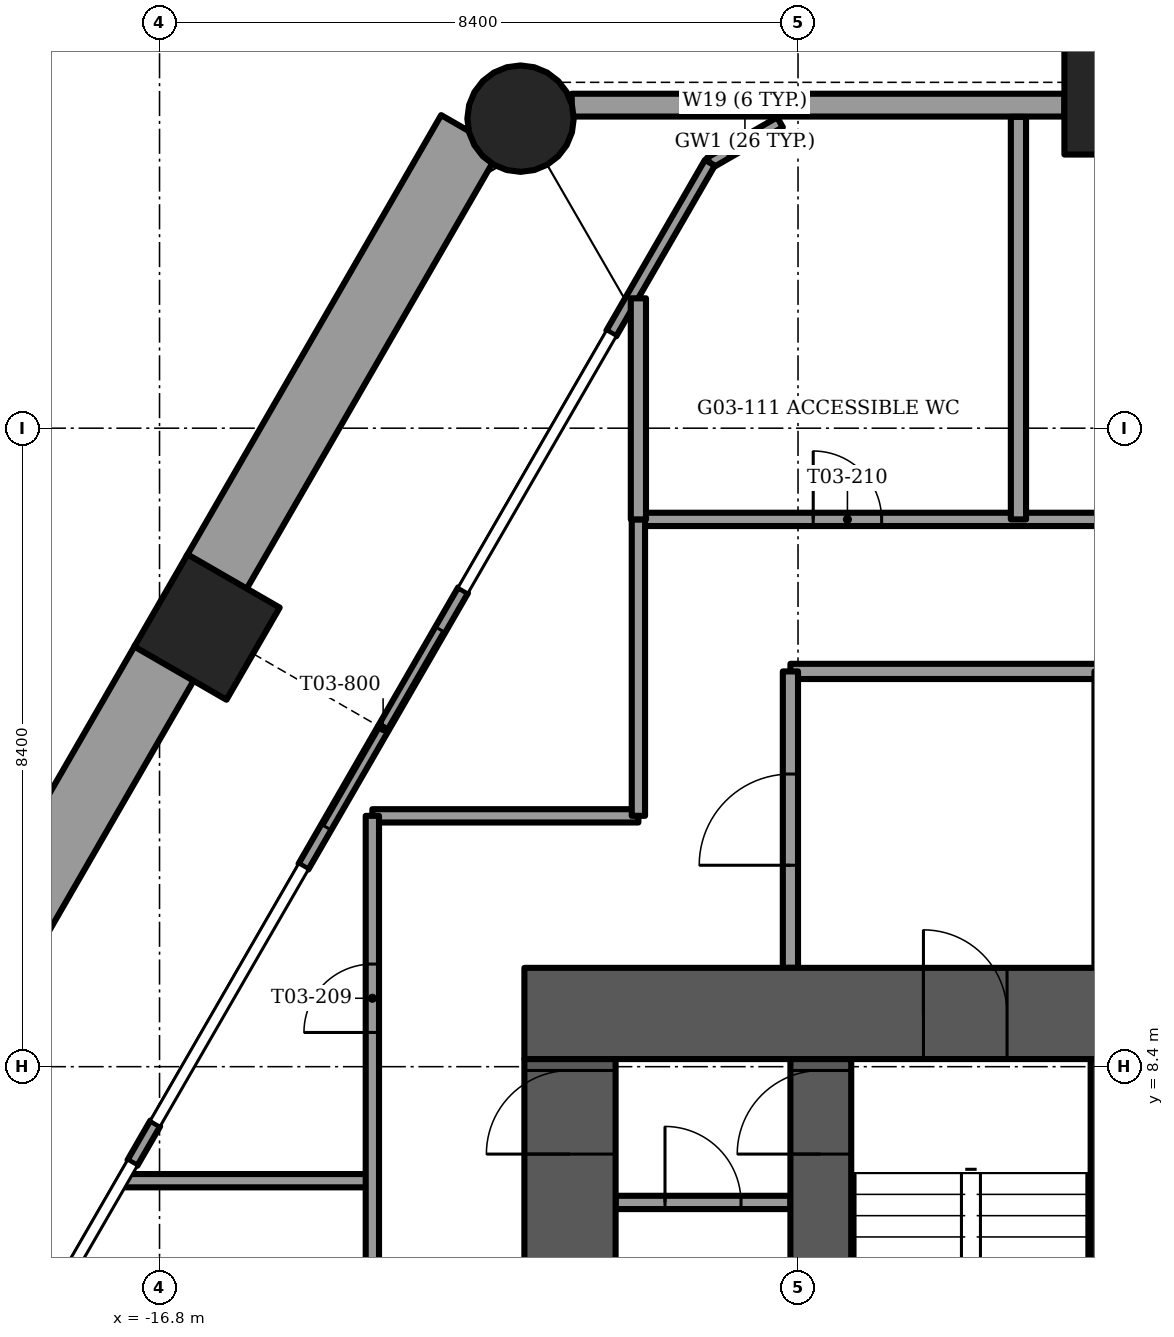
"""IFC4 building model, lengths in metres.
Left out: names, types, materials, properties, quantities, classifications, styles, units other than length and angle.
Written with IfcOpenShell. Run it as: python <this file> out.ifc"""

import sys

from ifc_helpers import new_model, si_unit, direction, frame, frame_2d, origin, origin_2d, place, context, subcontext, project, spatial, rectangle, circle, extrude, element, fill, save


model = new_model("IFC4")
c1 = context("Model", 3, precision=1e-05, world=origin(), true_north=direction((0.0, 1.0)))
c2 = subcontext(c1, "Body", "Model", "MODEL_VIEW")
j1 = project(units=[si_unit("LENGTHUNIT", "METRE"), si_unit("PLANEANGLEUNIT", "RADIAN")], contexts=[c1])
p1 = place(None, origin())
s1 = spatial("IfcSite", under=j1, at=p1, CompositionType="ELEMENT")
p2 = place(p1, origin())
s2 = spatial("IfcBuilding", under=s1, at=p2, CompositionType="ELEMENT")
p3 = place(p2, frame((0.0, 0.0, 14.5)))
s3 = spatial("IfcBuildingStorey", under=s2, at=p3, CompositionType="ELEMENT", Elevation=14.5)
p4 = place(p3, frame((-12.051, 20.872, -1.2), z_axis=(0.0, 0.0, 1.0), x_axis=(1.0, 0.0, 0.0)))
e1 = element("IfcColumn", 1, at=p4, inside=s3, PredefinedType="COLUMN", context=c2, shape_type="SweptSolid", body=[
    extrude(circle(Radius=0.7, at=origin_2d()), origin(), (0.0, 0.0, 1.0), 4.5),
])
for number, where, z_axis, x_axis in (
    (2, (-4.195, 21.1, -1.2), (0.0, 0.0, 1.0), (1.0, 0.0, 0.0)),
    (3, (-16.175, 14.183, -1.2), (0.0, 0.0, 1.0), (0.5, 0.866, 0.0)),
):
    element("IfcColumn", number, at=place(p3, frame(where, z_axis=z_axis, x_axis=x_axis)), inside=s3, PredefinedType="COLUMN", context=c2, shape_type="SweptSolid", body=[
        extrude(rectangle(XDim=1.4, YDim=1.4, at=origin_2d()), origin(), (0.0, 0.0, 1.0), 4.5),
    ])
p5 = place(p3, frame((-12.0, 9.1, -0.3), z_axis=(0.0, 0.0, 1.0), x_axis=(1.0, 0.0, 0.0)))
e4 = element("IfcWall", 4, at=p5, inside=s3, PredefinedType="SHEAR", context=c2, shape_type="SweptSolid", body=[
    extrude(rectangle(XDim=24.0, YDim=1.2, at=frame_2d((12.0, 0.0))), origin(), (0.0, 0.0, 1.0), 4.5),
])
p6 = place(p5, frame((11.2, 0.0, 0.0)))
e5 = element("IfcOpeningElement", 5, at=p6, cuts=e4, PredefinedType="OPENING", context=c2, shape_type="SweptSolid", body=[
    extrude(rectangle(XDim=1.6, YDim=2.1, at=frame_2d((0.8, 1.05))), frame((0.0, 0.6, 0.0), z_axis=(0.0, -1.0, 0.0), x_axis=(1.0, 0.0, 0.0)), (0.0, 0.0, 1.0), 1.2),
])
p7 = place(p5, frame((5.25, 0.0, 0.0)))
e6 = element("IfcOpeningElement", 6, at=p7, cuts=e4, PredefinedType="OPENING", context=c2, shape_type="SweptSolid", body=[
    extrude(rectangle(XDim=1.1, YDim=2.1, at=frame_2d((0.55, 1.05))), frame((0.0, 0.6, 0.0), z_axis=(0.0, -1.0, 0.0), x_axis=(1.0, 0.0, 0.0)), (0.0, 0.0, 1.0), 1.2),
])
p8 = place(p5, frame((17.65, 0.0, 0.0)))
e7 = element("IfcOpeningElement", 7, at=p8, cuts=e4, PredefinedType="OPENING", context=c2, shape_type="SweptSolid", body=[
    extrude(rectangle(XDim=1.1, YDim=2.1, at=frame_2d((0.55, 1.05))), frame((0.0, 0.6, 0.0), z_axis=(0.0, -1.0, 0.0), x_axis=(1.0, 0.0, 0.0)), (0.0, 0.0, 1.0), 1.2),
])
p9 = place(p3, frame((-8.1, -0.5, -0.3), z_axis=(0.0, 0.0, 1.0), x_axis=(0.0, 1.0, 0.0)))
e8 = element("IfcWall", 8, at=p9, inside=s3, PredefinedType="SHEAR", context=c2, shape_type="SweptSolid", body=[
    extrude(rectangle(XDim=9.0, YDim=0.8, at=frame_2d((4.5, 0.0))), origin(), (0.0, 0.0, 1.0), 4.5),
])
p10 = place(p9, frame((7.75, 0.0, 0.0)))
e9 = element("IfcOpeningElement", 9, at=p10, cuts=e8, PredefinedType="OPENING", context=c2, shape_type="SweptSolid", body=[
    extrude(rectangle(XDim=1.1, YDim=2.1, at=frame_2d((0.55, 1.05))), frame((0.0, 0.4, 0.0), z_axis=(0.0, -1.0, 0.0), x_axis=(1.0, 0.0, 0.0)), (0.0, 0.0, 1.0), 0.8),
])
p11 = place(p3, frame((-11.4, -0.5, -0.3), z_axis=(0.0, 0.0, 1.0), x_axis=(0.0, 1.0, 0.0)))
e10 = element("IfcWall", 10, at=p11, inside=s3, PredefinedType="SHEAR", context=c2, shape_type="SweptSolid", body=[
    extrude(rectangle(XDim=9.0, YDim=1.2, at=frame_2d((4.5, 0.0))), origin(), (0.0, 0.0, 1.0), 4.5),
])
p12 = place(p11, frame((7.75, 0.0, 0.0)))
e11 = element("IfcOpeningElement", 11, at=p12, cuts=e10, PredefinedType="OPENING", context=c2, shape_type="SweptSolid", body=[
    extrude(rectangle(XDim=1.1, YDim=2.1, at=frame_2d((0.55, 1.05))), frame((0.0, 0.6, 0.0), z_axis=(0.0, -1.0, 0.0), x_axis=(1.0, 0.0, 0.0)), (0.0, 0.0, 1.0), 1.2),
])
p13 = place(p11, frame((0.55, 0.0, 0.0)))
e12 = element("IfcOpeningElement", 12, at=p13, cuts=e10, PredefinedType="OPENING", context=c2, shape_type="SweptSolid", body=[
    extrude(rectangle(XDim=1.2, YDim=2.1, at=frame_2d((0.6, 1.05))), frame((0.0, 0.6, 0.0), z_axis=(0.0, -1.0, 0.0), x_axis=(1.0, 0.0, 0.0)), (0.0, 0.0, 1.0), 1.2),
])
p14 = place(p11, frame((3.0, 0.0, 0.0)))
e13 = element("IfcOpeningElement", 13, at=p14, cuts=e10, PredefinedType="OPENING", context=c2, shape_type="SweptSolid", body=[
    extrude(rectangle(XDim=1.2, YDim=2.1, at=frame_2d((0.6, 1.05))), frame((0.0, 0.6, 0.0), z_axis=(0.0, -1.0, 0.0), x_axis=(1.0, 0.0, 0.0)), (0.0, 0.0, 1.0), 1.2),
])
p15 = place(p3, frame((-12.705, 20.694, 0.0), z_axis=(0.0, 0.0, 1.0), x_axis=(-0.500005133765, -0.866022439784, 0.0)))
e14 = element("IfcWall", 14, at=p15, inside=s3, PredefinedType="PARAPET", context=c2, shape_type="SweptSolid", body=[
    extrude(rectangle(XDim=6.704, YDim=0.9, at=frame_2d((3.352, 0.0))), origin(), (0.0, 0.0, 1.0), 1.1),
])
p16 = place(p3, frame((-16.727, 13.728, 0.0), z_axis=(0.0, 0.0, 1.0), x_axis=(-0.499997206141, -0.866027016814, 0.0)))
e15 = element("IfcWall", 15, at=p16, inside=s3, PredefinedType="PARAPET", context=c2, shape_type="SweptSolid", body=[
    extrude(rectangle(XDim=7.051, YDim=0.9, at=frame_2d((3.525, 0.0))), origin(), (0.0, 0.0, 1.0), 1.1),
])
p17 = place(p3, frame((-4.896, 21.05, 0.0), z_axis=(0.0, 0.0, 1.0), x_axis=(-1.0, 0.0, 0.0)))
e16 = element("IfcWall", 16, at=p17, inside=s3, PredefinedType="SOLIDWALL", context=c2, shape_type="SweptSolid", body=[
    extrude(rectangle(XDim=6.481, YDim=0.3, at=frame_2d((3.241, 0.0))), origin(), (0.0, 0.0, 1.0), 3.3),
])
p18 = place(p3, frame((-12.806, 14.668, 0.0), z_axis=(0.0, 0.0, 1.0), x_axis=(-0.500027713859, -0.866009402589, 0.0)))
e17 = element("IfcWall", 17, at=p18, inside=s3, PredefinedType="SOLIDWALL", context=c2, shape_type="SweptSolid", body=[
    extrude(rectangle(XDim=4.2, YDim=0.15, at=frame_2d((2.1, 0.0))), origin(), (0.0, 0.0, 1.0), 4.2),
])
p19 = place(p18, frame((0.6, 0.0, 0.0)))
e18 = element("IfcOpeningElement", 18, at=p19, cuts=e17, PredefinedType="OPENING", context=c2, shape_type="SweptSolid", body=[
    extrude(rectangle(XDim=3.0, YDim=2.4, at=frame_2d((1.5, 1.2))), frame((0.0, 0.075, 0.0), z_axis=(0.0, -1.0, 0.0), x_axis=(1.0, 0.0, 0.0)), (0.0, 0.0, 1.0), 0.15),
])
p20 = place(p3, frame((-9.56, 20.292, 0.0), z_axis=(0.0, 0.0, 1.0), x_axis=(-0.499945140294, -0.866057074734, 0.0)))
e19 = element("IfcWall", 19, at=p20, inside=s3, PredefinedType="SOLIDWALL", context=c2, shape_type="SweptSolid", body=[
    extrude(rectangle(XDim=2.594, YDim=0.15, at=frame_2d((1.297, 0.0))), origin(), (0.0, 0.0, 1.0), 4.2),
])
p21 = place(p3, frame((-16.856, 7.654, 0.0), z_axis=(0.0, 0.0, 1.0), x_axis=(-0.499945471869, -0.866056883327, 0.0)))
e20 = element("IfcWall", 20, at=p21, inside=s3, PredefinedType="SOLIDWALL", context=c2, shape_type="SweptSolid", body=[
    extrude(rectangle(XDim=0.6, YDim=0.15, at=frame_2d((0.3, 0.0))), origin(), (0.0, 0.0, 1.0), 4.2),
])
p22 = place(p3, frame((-8.637, 20.825, 0.0), z_axis=(0.0, 0.0, 1.0), x_axis=(-0.866048165231, -0.499960573946, 0.0)))
e21 = element("IfcWall", 21, at=p22, inside=s3, PredefinedType="SOLIDWALL", context=c2, shape_type="SweptSolid", body=[
    extrude(rectangle(XDim=1.065, YDim=0.15, at=frame_2d((0.532, 0.0))), origin(), (0.0, 0.0, 1.0), 4.2),
])
p23 = place(p22, frame((0.258, 0.0, 0.15)))
e22 = element("IfcOpeningElement", 22, at=p23, cuts=e21, PredefinedType="OPENING", context=c2, shape_type="SweptSolid", body=[
    extrude(rectangle(XDim=0.55, YDim=3.6, at=frame_2d((0.275, 1.8))), frame((0.0, 0.075, 0.0), z_axis=(0.0, -1.0, 0.0), x_axis=(1.0, 0.0, 0.0)), (0.0, 0.0, 1.0), 0.15),
])
p24 = place(p3, frame((-4.45, 0.9, -0.3), z_axis=(0.0, 0.0, 1.0), x_axis=(0.0, 1.0, 0.0)))
e23 = element("IfcWall", 23, at=p24, inside=s3, PredefinedType="SOLIDWALL", context=c2, shape_type="SweptSolid", body=[
    extrude(rectangle(XDim=7.6, YDim=0.2, at=frame_2d((3.8, 0.0))), origin(), (0.0, 0.0, 1.0), 4.5),
])
p25 = place(p3, frame((-8.5, 13.6, 0.0), z_axis=(0.0, 0.0, 1.0), x_axis=(1.0, 0.0, 0.0)))
e24 = element("IfcWall", 24, at=p25, inside=s3, PredefinedType="PARTITIONING", context=c2, shape_type="SweptSolid", body=[
    extrude(rectangle(XDim=17.0, YDim=0.2, at=frame_2d((8.5, 0.0))), origin(), (0.0, 0.0, 1.0), 4.2),
])
p26 = place(p3, frame((-8.5, 9.7, 0.0), z_axis=(0.0, 0.0, 1.0), x_axis=(0.0, 1.0, 0.0)))
e25 = element("IfcWall", 25, at=p26, inside=s3, PredefinedType="PARTITIONING", context=c2, shape_type="SweptSolid", body=[
    extrude(rectangle(XDim=3.9, YDim=0.2, at=frame_2d((1.95, 0.0))), origin(), (0.0, 0.0, 1.0), 4.2),
])
p27 = place(p26, frame((1.35, 0.0, 0.0)))
e26 = element("IfcOpeningElement", 26, at=p27, cuts=e25, PredefinedType="OPENING", context=c2, shape_type="SweptSolid", body=[
    extrude(rectangle(XDim=1.2, YDim=2.1, at=frame_2d((0.6, 1.05))), frame((0.0, 0.1, 0.0), z_axis=(0.0, -1.0, 0.0), x_axis=(1.0, 0.0, 0.0)), (0.0, 0.0, 1.0), 0.2),
])
p28 = place(p3, frame((-10.8, 6.614, 0.0), z_axis=(0.0, 0.0, 1.0), x_axis=(1.0, 0.0, 0.0)))
e27 = element("IfcWall", 27, at=p28, inside=s3, PredefinedType="PARTITIONING", context=c2, shape_type="SweptSolid", body=[
    extrude(rectangle(XDim=2.3, YDim=0.175, at=frame_2d((1.15, 0.0))), origin(), (0.0, 0.0, 1.0), 4.2),
])
p29 = place(p28, frame((0.65, 0.0, 0.0)))
e28 = element("IfcOpeningElement", 28, at=p29, cuts=e27, PredefinedType="OPENING", context=c2, shape_type="SweptSolid", body=[
    extrude(rectangle(XDim=1.0, YDim=2.1, at=frame_2d((0.5, 1.05))), frame((0.0, 0.087, 0.0), z_axis=(0.0, -1.0, 0.0), x_axis=(1.0, 0.0, 0.0)), (0.0, 0.0, 1.0), 0.175),
])
p30 = place(p3, frame((-17.271, 6.9, 0.0), z_axis=(0.0, 0.0, 1.0), x_axis=(1.0, 0.0, 0.0)))
e29 = element("IfcWall", 29, at=p30, inside=s3, PredefinedType="PARTITIONING", context=c2, shape_type="SweptSolid", body=[
    extrude(rectangle(XDim=3.271, YDim=0.175, at=frame_2d((1.635, 0.0))), origin(), (0.0, 0.0, 1.0), 4.2),
])
p31 = place(p3, frame((-14.0, 11.7, 0.0), z_axis=(0.0, 0.0, 1.0), x_axis=(1.0, 0.0, 0.0)))
e30 = element("IfcWall", 30, at=p31, inside=s3, PredefinedType="PARTITIONING", context=c2, shape_type="SweptSolid", body=[
    extrude(rectangle(XDim=3.5, YDim=0.175, at=frame_2d((1.75, 0.0))), origin(), (0.0, 0.0, 1.0), 4.2),
])
p32 = place(p3, frame((-10.5, 15.6, 0.0), z_axis=(0.0, 0.0, 1.0), x_axis=(1.0, 0.0, 0.0)))
e31 = element("IfcWall", 31, at=p32, inside=s3, PredefinedType="PARTITIONING", context=c2, shape_type="SweptSolid", body=[
    extrude(rectangle(XDim=21.0, YDim=0.175, at=frame_2d((10.5, 0.0))), origin(), (0.0, 0.0, 1.0), 4.2),
])
p33 = place(p32, frame((2.3, 0.0, 0.0)))
e32 = element("IfcOpeningElement", 32, at=p33, cuts=e31, PredefinedType="OPENING", context=c2, shape_type="SweptSolid", body=[
    extrude(rectangle(XDim=0.9, YDim=2.1, at=frame_2d((0.45, 1.05))), frame((0.0, 0.087, 0.0), z_axis=(0.0, -1.0, 0.0), x_axis=(1.0, 0.0, 0.0)), (0.0, 0.0, 1.0), 0.175),
])
p34 = place(p32, frame((7.5, 0.0, 0.0)))
e33 = element("IfcOpeningElement", 33, at=p34, cuts=e31, PredefinedType="OPENING", context=c2, shape_type="SweptSolid", body=[
    extrude(rectangle(XDim=0.9, YDim=2.1, at=frame_2d((0.45, 1.05))), frame((0.0, 0.087, 0.0), z_axis=(0.0, -1.0, 0.0), x_axis=(1.0, 0.0, 0.0)), (0.0, 0.0, 1.0), 0.175),
])
p35 = place(p32, frame((12.25, 0.0, 0.0)))
e34 = element("IfcOpeningElement", 34, at=p35, cuts=e31, PredefinedType="OPENING", context=c2, shape_type="SweptSolid", body=[
    extrude(rectangle(XDim=0.9, YDim=2.1, at=frame_2d((0.45, 1.05))), frame((0.0, 0.087, 0.0), z_axis=(0.0, -1.0, 0.0), x_axis=(1.0, 0.0, 0.0)), (0.0, 0.0, 1.0), 0.175),
])
p36 = place(p32, frame((15.8, 0.0, 0.0)))
e35 = element("IfcOpeningElement", 35, at=p36, cuts=e31, PredefinedType="OPENING", context=c2, shape_type="SweptSolid", body=[
    extrude(rectangle(XDim=0.9, YDim=2.1, at=frame_2d((0.45, 1.05))), frame((0.0, 0.087, 0.0), z_axis=(0.0, -1.0, 0.0), x_axis=(1.0, 0.0, 0.0)), (0.0, 0.0, 1.0), 0.175),
])
p37 = place(p3, frame((-14.0, -3.7, 0.0), z_axis=(0.0, 0.0, 1.0), x_axis=(0.0, 1.0, 0.0)))
e36 = element("IfcWall", 36, at=p37, inside=s3, PredefinedType="PARTITIONING", context=c2, shape_type="SweptSolid", body=[
    extrude(rectangle(XDim=15.4, YDim=0.175, at=frame_2d((7.7, 0.0))), origin(), (0.0, 0.0, 1.0), 4.2),
])
p38 = place(p37, frame((4.5, 0.0, 0.0)))
e37 = element("IfcOpeningElement", 37, at=p38, cuts=e36, PredefinedType="OPENING", context=c2, shape_type="SweptSolid", body=[
    extrude(rectangle(XDim=1.6, YDim=2.1, at=frame_2d((0.8, 1.05))), frame((0.0, 0.087, 0.0), z_axis=(0.0, -1.0, 0.0), x_axis=(1.0, 0.0, 0.0)), (0.0, 0.0, 1.0), 0.175),
])
p39 = place(p37, frame((12.55, 0.0, 0.0)))
e38 = element("IfcOpeningElement", 38, at=p39, cuts=e36, PredefinedType="OPENING", context=c2, shape_type="SweptSolid", body=[
    extrude(rectangle(XDim=0.9, YDim=2.1, at=frame_2d((0.45, 1.05))), frame((0.0, 0.087, 0.0), z_axis=(0.0, -1.0, 0.0), x_axis=(1.0, 0.0, 0.0)), (0.0, 0.0, 1.0), 0.175),
])
p40 = place(p3, frame((-10.5, 11.7, 0.0), z_axis=(0.0, 0.0, 1.0), x_axis=(0.0, 1.0, 0.0)))
e39 = element("IfcWall", 39, at=p40, inside=s3, PredefinedType="PARTITIONING", context=c2, shape_type="SweptSolid", body=[
    extrude(rectangle(XDim=3.9, YDim=0.175, at=frame_2d((1.95, 0.0))), origin(), (0.0, 0.0, 1.0), 4.2),
])
p41 = place(p3, frame((-10.5, 15.6, 0.0), z_axis=(0.0, 0.0, 1.0), x_axis=(0.0, 1.0, 0.0)))
e40 = element("IfcWall", 40, at=p41, inside=s3, PredefinedType="PARTITIONING", context=c2, shape_type="SweptSolid", body=[
    extrude(rectangle(XDim=2.908, YDim=0.2, at=frame_2d((1.454, 0.0))), origin(), (0.0, 0.0, 1.0), 4.2),
])
p42 = place(p3, frame((-5.5, 15.6, 0.0), z_axis=(0.0, 0.0, 1.0), x_axis=(0.0, 1.0, 0.0)))
e41 = element("IfcWall", 41, at=p42, inside=s3, PredefinedType="PARTITIONING", context=c2, shape_type="SweptSolid", body=[
    extrude(rectangle(XDim=5.295, YDim=0.2, at=frame_2d((2.647, 0.0))), origin(), (0.0, 0.0, 1.0), 4.2),
])
p43 = place(p19, origin())
e42 = element("IfcDoor", 42, at=p43, inside=s3, OperationType="SLIDING_TO_RIGHT", PredefinedType="DOOR", context=c2, shape_type="SweptSolid", body=[
    extrude(rectangle(XDim=3.0, YDim=2.4, at=frame_2d((1.5, 1.2))), frame((0.0, 0.025, 0.0), z_axis=(0.0, -1.0, 0.0), x_axis=(1.0, 0.0, 0.0)), (0.0, 0.0, 1.0), 0.05),
])
fill(e18, e42)
p44 = place(p23, origin())
e43 = element("IfcWindow", 43, at=p44, inside=s3, PartitioningType="SINGLE_PANEL", PredefinedType="WINDOW", context=c2, shape_type="SweptSolid", body=[
    extrude(rectangle(XDim=0.55, YDim=3.6, at=frame_2d((0.275, 1.8))), frame((0.0, 0.03, 0.0), z_axis=(0.0, -1.0, 0.0), x_axis=(1.0, 0.0, 0.0)), (0.0, 0.0, 1.0), 0.06),
])
fill(e22, e43)
p45 = place(p7, origin())
e44 = element("IfcDoor", 44, at=p45, inside=s3, OperationType="SINGLE_SWING_LEFT", PredefinedType="DOOR", context=c2, shape_type="SweptSolid", body=[
    extrude(rectangle(XDim=1.1, YDim=2.1, at=frame_2d((0.55, 1.05))), frame((0.0, 0.025, 0.0), z_axis=(0.0, -1.0, 0.0), x_axis=(1.0, 0.0, 0.0)), (0.0, 0.0, 1.0), 0.05),
])
fill(e6, e44)
p46 = place(p10, origin())
e45 = element("IfcDoor", 45, at=p46, inside=s3, OperationType="SINGLE_SWING_RIGHT", PredefinedType="DOOR", context=c2, shape_type="SweptSolid", body=[
    extrude(rectangle(XDim=1.1, YDim=2.1, at=frame_2d((0.55, 1.05))), frame((0.0, 0.025, 0.0), z_axis=(0.0, -1.0, 0.0), x_axis=(1.0, 0.0, 0.0)), (0.0, 0.0, 1.0), 0.05),
])
fill(e9, e45)
p47 = place(p27, origin())
e46 = element("IfcDoor", 46, at=p47, inside=s3, OperationType="SINGLE_SWING_LEFT", PredefinedType="DOOR", context=c2, shape_type="SweptSolid", body=[
    extrude(rectangle(XDim=1.2, YDim=2.1, at=frame_2d((0.6, 1.05))), frame((0.0, 0.025, 0.0), z_axis=(0.0, -1.0, 0.0), x_axis=(1.0, 0.0, 0.0)), (0.0, 0.0, 1.0), 0.05),
])
fill(e26, e46)
p48 = place(p29, origin())
e47 = element("IfcDoor", 47, at=p48, inside=s3, OperationType="SINGLE_SWING_LEFT", PredefinedType="DOOR", context=c2, shape_type="SweptSolid", body=[
    extrude(rectangle(XDim=1.0, YDim=2.1, at=frame_2d((0.5, 1.05))), frame((0.0, 0.025, 0.0), z_axis=(0.0, -1.0, 0.0), x_axis=(1.0, 0.0, 0.0)), (0.0, 0.0, 1.0), 0.05),
])
fill(e28, e47)
p49 = place(p12, origin())
e48 = element("IfcDoor", 48, at=p49, inside=s3, OperationType="SINGLE_SWING_LEFT", PredefinedType="DOOR", context=c2, shape_type="SweptSolid", body=[
    extrude(rectangle(XDim=1.1, YDim=2.1, at=frame_2d((0.55, 1.05))), frame((0.0, 0.025, 0.0), z_axis=(0.0, -1.0, 0.0), x_axis=(1.0, 0.0, 0.0)), (0.0, 0.0, 1.0), 0.05),
])
fill(e11, e48)
p50 = place(p39, origin())
e49 = element("IfcDoor", 49, at=p50, inside=s3, OperationType="SINGLE_SWING_LEFT", PredefinedType="DOOR", context=c2, shape_type="SweptSolid", body=[
    extrude(rectangle(XDim=0.9, YDim=2.1, at=frame_2d((0.45, 1.05))), frame((0.0, 0.025, 0.0), z_axis=(0.0, -1.0, 0.0), x_axis=(1.0, 0.0, 0.0)), (0.0, 0.0, 1.0), 0.05),
])
fill(e38, e49)
p51 = place(p33, origin())
e50 = element("IfcDoor", 50, at=p51, inside=s3, OperationType="SINGLE_SWING_RIGHT", PredefinedType="DOOR", context=c2, shape_type="SweptSolid", body=[
    extrude(rectangle(XDim=0.9, YDim=2.1, at=frame_2d((0.45, 1.05))), frame((0.0, 0.025, 0.0), z_axis=(0.0, -1.0, 0.0), x_axis=(1.0, 0.0, 0.0)), (0.0, 0.0, 1.0), 0.05),
])
fill(e32, e50)
save(model, sys.argv[1])
